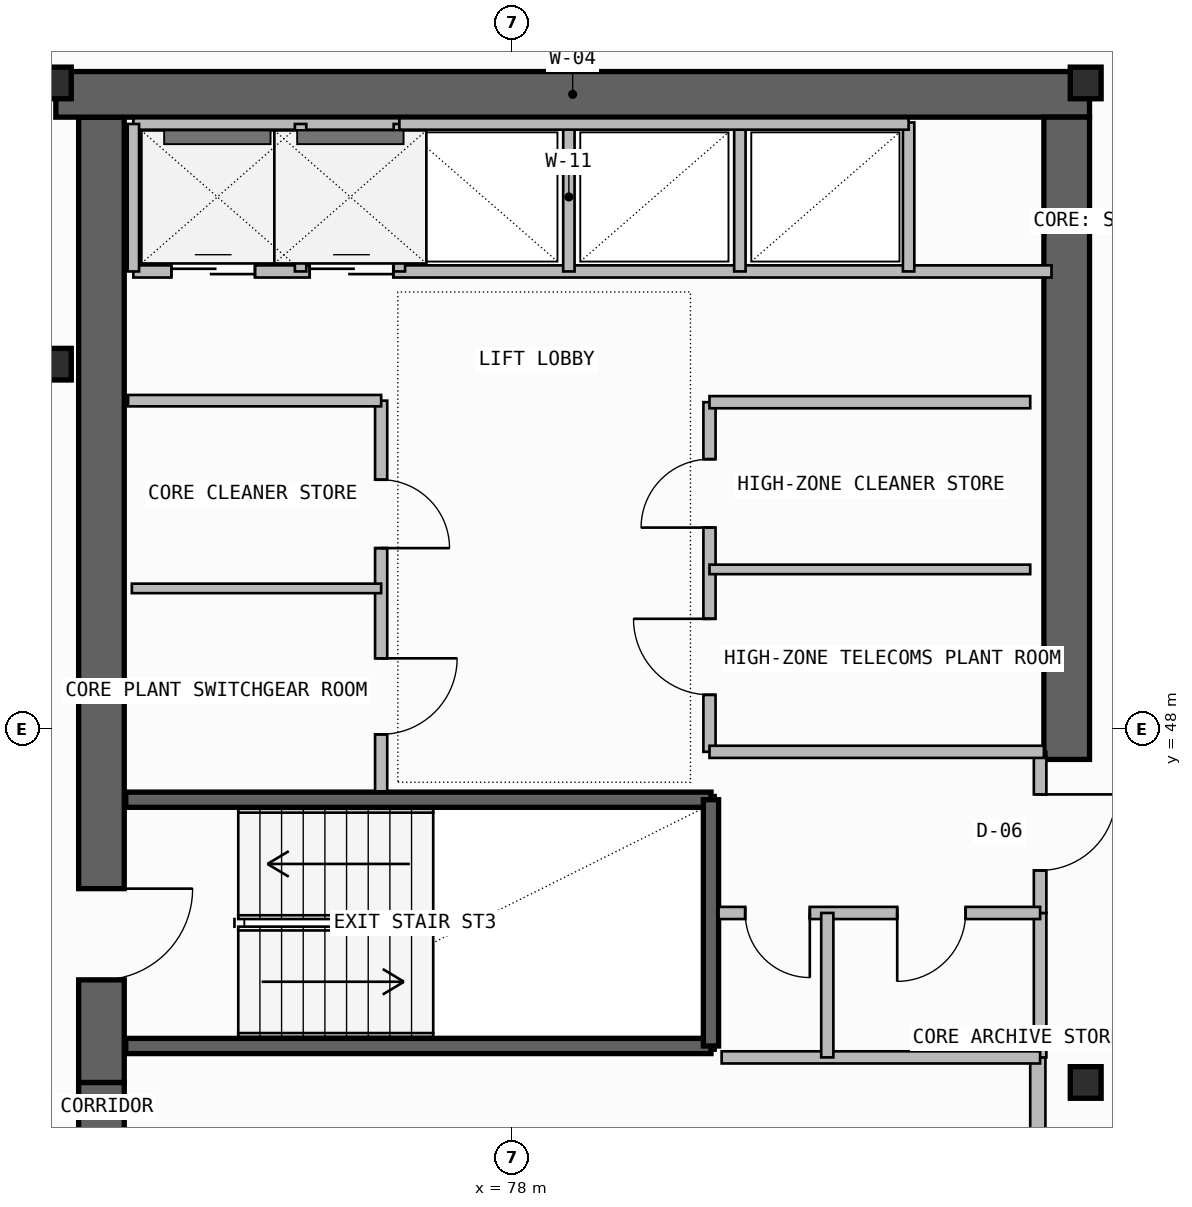
"""IFC4 building model, lengths in metres.
Left out: names, types, materials, properties, quantities, classifications, styles, units other than length and angle.
Written with IfcOpenShell. Run it as: python <this file> out.ifc"""

import sys

from ifc_helpers import new_model, si_unit, direction, frame, frame_2d, origin, origin_2d, place, context, subcontext, project, spatial, rectangle, i_section, extrude, element, fill, save


model = new_model("IFC4")
c1 = context("Model", 3, precision=1e-05, world=origin(), true_north=direction((0.0, 1.0)))
c2 = subcontext(c1, "Body", "Model", "MODEL_VIEW")
j1 = project(units=[si_unit("LENGTHUNIT", "METRE"), si_unit("PLANEANGLEUNIT", "RADIAN")], contexts=[c1])
p1 = place(None, origin())
s1 = spatial("IfcSite", under=j1, at=p1, CompositionType="ELEMENT")
p2 = place(p1, origin())
s2 = spatial("IfcBuilding", under=s1, at=p2, CompositionType="ELEMENT")
p3 = place(p2, frame((0.0, 0.0, 288.9)))
s3 = spatial("IfcBuildingStorey", under=s2, at=p3, CompositionType="ELEMENT", Elevation=288.9)
p4 = place(p3, frame((72.6, 35.5, -0.26), z_axis=(0.0, 0.0, 1.0), x_axis=(0.0, 1.0, 0.0)))
e1 = element("IfcWall", 1, at=p4, inside=s3, PredefinedType="SHEAR", context=c2, shape_type="SweptSolid", body=[
    extrude(rectangle(XDim=7.85, YDim=0.6, at=frame_2d((3.925, 0.0))), origin(), (0.0, 0.0, 1.0), 3.52),
])
p5 = place(p4, frame((1.45, 0.0, 0.26)))
e2 = element("IfcOpeningElement", 2, at=p5, cuts=e1, PredefinedType="OPENING", context=c2, shape_type="SweptSolid", body=[
    extrude(rectangle(XDim=1.2, YDim=2.2, at=frame_2d((0.6, 1.1))), frame((0.0, 0.31, 0.0), z_axis=(0.0, -1.0, 0.0), x_axis=(1.0, 0.0, 0.0)), (0.0, 0.0, 1.0), 0.62),
])
p6 = place(p3, frame((72.6, 43.35, -0.26), z_axis=(0.0, 0.0, 1.0), x_axis=(0.0, 1.0, 0.0)))
e3 = element("IfcWall", 3, at=p6, inside=s3, PredefinedType="SHEAR", context=c2, shape_type="SweptSolid", body=[
    extrude(rectangle(XDim=12.7, YDim=0.6, at=frame_2d((6.35, 0.0))), origin(), (0.0, 0.0, 1.0), 3.52),
])
p7 = place(p6, frame((1.35, 0.0, 0.26)))
e4 = element("IfcOpeningElement", 4, at=p7, cuts=e3, PredefinedType="OPENING", context=c2, shape_type="SweptSolid", body=[
    extrude(rectangle(XDim=1.2, YDim=2.2, at=frame_2d((0.6, 1.1))), frame((0.0, 0.31, 0.0), z_axis=(0.0, -1.0, 0.0), x_axis=(1.0, 0.0, 0.0)), (0.0, 0.0, 1.0), 0.62),
])
p8 = place(p3, frame((72.0, 56.35, -0.26), z_axis=(0.0, 0.0, 1.0), x_axis=(1.0, 0.0, 0.0)))
e5 = element("IfcWall", 5, at=p8, inside=s3, PredefinedType="SHEAR", context=c2, shape_type="SweptSolid", body=[
    extrude(rectangle(XDim=13.6, YDim=0.6, at=frame_2d((6.8, 0.0))), origin(), (0.0, 0.0, 1.0), 3.52),
])
p9 = place(p3, frame((85.3, 47.6, -0.26), z_axis=(0.0, 0.0, 1.0), x_axis=(0.0, 1.0, 0.0)))
e6 = element("IfcWall", 6, at=p9, inside=s3, PredefinedType="SHEAR", context=c2, shape_type="SweptSolid", body=[
    extrude(rectangle(XDim=8.45, YDim=0.6, at=frame_2d((4.225, 0.0))), origin(), (0.0, 0.0, 1.0), 3.52),
])
for number, where, z_axis, x_axis in (
    (7, (85.55, 43.35, 0.0), (0.0, 0.0, 1.0), (1.0, 0.0, 0.0)),
    (8, (72.0, 52.8, 0.0), (0.0, 0.0, 1.0), (1.0, 0.0, 0.0)),
    (9, (72.0, 56.5, 0.0), (0.0, 0.0, 1.0), (1.0, 0.0, 0.0)),
    (10, (85.55, 56.5, 0.0), (0.0, 0.0, 1.0), (1.0, 0.0, 0.0)),
):
    element("IfcColumn", number, at=place(p3, frame(where, z_axis=z_axis, x_axis=x_axis)), inside=s3, PredefinedType="COLUMN", context=c2, shape_type="SweptSolid", body=[
        extrude(i_section(OverallWidth=0.406, OverallDepth=0.416, WebThickness=0.03, FlangeThickness=0.048, FilletRadius=0.015, at=origin_2d()), origin(), (0.0, 0.0, 1.0), 3.52),
    ])
p10 = place(p3, frame((84.92, 38.85, 0.0), z_axis=(0.0, 0.0, 1.0), x_axis=(0.0, 1.0, 0.0)))
e11 = element("IfcWall", 11, at=p10, inside=s3, PredefinedType="SOLIDWALL", context=c2, shape_type="SweptSolid", body=[
    extrude(rectangle(XDim=4.83, YDim=0.2, at=frame_2d((2.415, 0.0))), origin(), (0.0, 0.0, 1.0), 3.26),
])
p11 = place(p10, frame((1.25, 0.0, 0.0)))
e12 = element("IfcOpeningElement", 12, at=p11, cuts=e11, PredefinedType="OPENING", context=c2, shape_type="SweptSolid", body=[
    extrude(rectangle(XDim=1.1, YDim=2.2, at=frame_2d((0.55, 1.1))), frame((0.0, 0.11, 0.0), z_axis=(0.0, -1.0, 0.0), x_axis=(1.0, 0.0, 0.0)), (0.0, 0.0, 1.0), 0.22),
])
for number, where, z_axis, x_axis in (
    (13, (72.92, 43.83, -0.26), (0.0, 0.0, 1.0), (1.0, 0.0, 0.0)),
    (14, (72.92, 47.07, -0.26), (0.0, 0.0, 1.0), (1.0, 0.0, 0.0)),
):
    element("IfcWall", number, at=place(p3, frame(where, z_axis=z_axis, x_axis=x_axis)), inside=s3, PredefinedType="SOLIDWALL", context=c2, shape_type="SweptSolid", body=[
        extrude(rectangle(XDim=7.7, YDim=0.2, at=frame_2d((3.85, 0.0))), origin(), (0.0, 0.0, 1.0), 3.52),
    ])
p12 = place(p3, frame((80.62, 43.83, -0.26), z_axis=(0.0, 0.0, 1.0), x_axis=(0.0, 1.0, 0.0)))
e15 = element("IfcWall", 15, at=p12, inside=s3, PredefinedType="SOLIDWALL", context=c2, shape_type="SweptSolid", body=[
    extrude(rectangle(XDim=3.24, YDim=0.2, at=frame_2d((1.62, 0.0))), origin(), (0.0, 0.0, 1.0), 3.52),
])
p13 = place(p3, frame((84.95, 43.68, 0.0), z_axis=(0.0, 0.0, 1.0), x_axis=(0.0, 1.0, 0.0)))
e16 = element("IfcWall", 16, at=p13, inside=s3, PredefinedType="PLUMBINGWALL", context=c2, shape_type="SweptSolid", body=[
    extrude(rectangle(XDim=1.9, YDim=0.165, at=frame_2d((0.95, 0.0))), origin(), (0.0, 0.0, 1.0), 3.26),
])
p14 = place(p3, frame((84.95, 45.58, 0.0), z_axis=(0.0, 0.0, 1.0), x_axis=(0.0, 1.0, 0.0)))
e17 = element("IfcWall", 17, at=p14, inside=s3, PredefinedType="PARTITIONING", context=c2, shape_type="SweptSolid", body=[
    extrude(rectangle(XDim=2.12, YDim=0.165, at=frame_2d((1.06, 0.0))), origin(), (0.0, 0.0, 1.0), 3.26),
])
p15 = place(p14, frame((0.56, 0.0, 0.0)))
e18 = element("IfcOpeningElement", 18, at=p15, cuts=e17, PredefinedType="OPENING", context=c2, shape_type="SweptSolid", body=[
    extrude(rectangle(XDim=1.0, YDim=2.2, at=frame_2d((0.5, 1.1))), frame((0.0, 0.093, 0.0), z_axis=(0.0, -1.0, 0.0), x_axis=(1.0, 0.0, 0.0)), (0.0, 0.0, 1.0), 0.185),
])
p16 = place(p3, frame((80.72, 45.58, 0.0), z_axis=(0.0, 0.0, 1.0), x_axis=(1.0, 0.0, 0.0)))
e19 = element("IfcWall", 19, at=p16, inside=s3, PredefinedType="PLUMBINGWALL", context=c2, shape_type="SweptSolid", body=[
    extrude(rectangle(XDim=4.23, YDim=0.16, at=frame_2d((2.115, 0.0))), origin(), (0.0, 0.0, 1.0), 3.26),
])
p17 = place(p16, frame((0.35, 0.0, 0.0)))
e20 = element("IfcOpeningElement", 20, at=p17, cuts=e19, PredefinedType="OPENING", context=c2, shape_type="SweptSolid", body=[
    extrude(rectangle(XDim=0.85, YDim=2.05, at=frame_2d((0.425, 1.025))), frame((0.0, 0.09, 0.0), z_axis=(0.0, -1.0, 0.0), x_axis=(1.0, 0.0, 0.0)), (0.0, 0.0, 1.0), 0.18),
])
p18 = place(p16, frame((2.35, 0.0, 0.0)))
e21 = element("IfcOpeningElement", 21, at=p18, cuts=e19, PredefinedType="OPENING", context=c2, shape_type="SweptSolid", body=[
    extrude(rectangle(XDim=0.9, YDim=2.1, at=frame_2d((0.45, 1.05))), frame((0.0, 0.09, 0.0), z_axis=(0.0, -1.0, 0.0), x_axis=(1.0, 0.0, 0.0)), (0.0, 0.0, 1.0), 0.18),
])
p19 = place(p3, frame((80.76, 43.68, 0.0), z_axis=(0.0, 0.0, 1.0), x_axis=(1.0, 0.0, 0.0)))
e22 = element("IfcWall", 22, at=p19, inside=s3, PredefinedType="PLUMBINGWALL", context=c2, shape_type="SweptSolid", body=[
    extrude(rectangle(XDim=4.19, YDim=0.16, at=frame_2d((2.095, 0.0))), origin(), (0.0, 0.0, 1.0), 3.26),
])
p20 = place(p3, frame((82.15, 43.68, 0.0), z_axis=(0.0, 0.0, 1.0), x_axis=(0.0, 1.0, 0.0)))
e23 = element("IfcWall", 23, at=p20, inside=s3, PredefinedType="PLUMBINGWALL", context=c2, shape_type="SweptSolid", body=[
    extrude(rectangle(XDim=1.9, YDim=0.16, at=frame_2d((0.95, 0.0))), origin(), (0.0, 0.0, 1.0), 3.26),
])
p21 = place(p3, frame((76.28, 47.18, 0.0), z_axis=(0.0, 0.0, 1.0), x_axis=(0.0, 1.0, 0.0)))
e24 = element("IfcWall", 24, at=p21, inside=s3, PredefinedType="SOLIDWALL", context=c2, shape_type="SweptSolid", body=[
    extrude(rectangle(XDim=5.14, YDim=0.16, at=frame_2d((2.57, 0.0))), origin(), (0.0, 0.0, 1.0), 3.26),
])
p22 = place(p21, frame((0.75, 0.0, 0.0)))
e25 = element("IfcOpeningElement", 25, at=p22, cuts=e24, PredefinedType="OPENING", context=c2, shape_type="SweptSolid", body=[
    extrude(rectangle(XDim=1.0, YDim=2.2, at=frame_2d((0.5, 1.1))), frame((0.0, 0.09, 0.0), z_axis=(0.0, -1.0, 0.0), x_axis=(1.0, 0.0, 0.0)), (0.0, 0.0, 1.0), 0.18),
])
p23 = place(p21, frame((3.2, 0.0, 0.0)))
e26 = element("IfcOpeningElement", 26, at=p23, cuts=e24, PredefinedType="OPENING", context=c2, shape_type="SweptSolid", body=[
    extrude(rectangle(XDim=0.9, YDim=2.1, at=frame_2d((0.45, 1.05))), frame((0.0, 0.09, 0.0), z_axis=(0.0, -1.0, 0.0), x_axis=(1.0, 0.0, 0.0)), (0.0, 0.0, 1.0), 0.18),
])
p24 = place(p3, frame((72.95, 52.32, 0.0), z_axis=(0.0, 0.0, 1.0), x_axis=(1.0, 0.0, 0.0)))
e27 = element("IfcWall", 27, at=p24, inside=s3, PredefinedType="SOLIDWALL", context=c2, shape_type="SweptSolid", body=[
    extrude(rectangle(XDim=3.33, YDim=0.15, at=frame_2d((1.665, 0.0))), origin(), (0.0, 0.0, 1.0), 3.26),
])
p25 = place(p3, frame((73.0, 49.85, 0.0), z_axis=(0.0, 0.0, 1.0), x_axis=(1.0, 0.0, 0.0)))
e28 = element("IfcWall", 28, at=p25, inside=s3, PredefinedType="PARTITIONING", context=c2, shape_type="SweptSolid", body=[
    extrude(rectangle(XDim=3.28, YDim=0.125, at=frame_2d((1.64, 0.0))), origin(), (0.0, 0.0, 1.0), 3.26),
])
p26 = place(p3, frame((80.6, 47.7, 0.0), z_axis=(0.0, 0.0, 1.0), x_axis=(0.0, 1.0, 0.0)))
e29 = element("IfcWall", 29, at=p26, inside=s3, PredefinedType="SOLIDWALL", context=c2, shape_type="SweptSolid", body=[
    extrude(rectangle(XDim=4.6, YDim=0.16, at=frame_2d((2.3, 0.0))), origin(), (0.0, 0.0, 1.0), 3.26),
])
p27 = place(p26, frame((0.75, 0.0, 0.0)))
e30 = element("IfcOpeningElement", 30, at=p27, cuts=e29, PredefinedType="OPENING", context=c2, shape_type="SweptSolid", body=[
    extrude(rectangle(XDim=1.0, YDim=2.2, at=frame_2d((0.5, 1.1))), frame((0.0, 0.09, 0.0), z_axis=(0.0, -1.0, 0.0), x_axis=(1.0, 0.0, 0.0)), (0.0, 0.0, 1.0), 0.18),
])
p28 = place(p26, frame((2.95, 0.0, 0.0)))
e31 = element("IfcOpeningElement", 31, at=p28, cuts=e29, PredefinedType="OPENING", context=c2, shape_type="SweptSolid", body=[
    extrude(rectangle(XDim=0.9, YDim=2.1, at=frame_2d((0.45, 1.05))), frame((0.0, 0.09, 0.0), z_axis=(0.0, -1.0, 0.0), x_axis=(1.0, 0.0, 0.0)), (0.0, 0.0, 1.0), 0.18),
])
p29 = place(p3, frame((80.6, 47.7, 0.0), z_axis=(0.0, 0.0, 1.0), x_axis=(1.0, 0.0, 0.0)))
e32 = element("IfcWall", 32, at=p29, inside=s3, PredefinedType="SOLIDWALL", context=c2, shape_type="SweptSolid", body=[
    extrude(rectangle(XDim=4.4, YDim=0.16, at=frame_2d((2.2, 0.0))), origin(), (0.0, 0.0, 1.0), 3.26),
])
p30 = place(p3, frame((80.6, 52.3, 0.0), z_axis=(0.0, 0.0, 1.0), x_axis=(1.0, 0.0, 0.0)))
e33 = element("IfcWall", 33, at=p30, inside=s3, PredefinedType="SOLIDWALL", context=c2, shape_type="SweptSolid", body=[
    extrude(rectangle(XDim=4.22, YDim=0.16, at=frame_2d((2.11, 0.0))), origin(), (0.0, 0.0, 1.0), 3.26),
])
p31 = place(p3, frame((80.6, 50.1, 0.0), z_axis=(0.0, 0.0, 1.0), x_axis=(1.0, 0.0, 0.0)))
e34 = element("IfcWall", 34, at=p31, inside=s3, PredefinedType="PARTITIONING", context=c2, shape_type="SweptSolid", body=[
    extrude(rectangle(XDim=4.22, YDim=0.125, at=frame_2d((2.11, 0.0))), origin(), (0.0, 0.0, 1.0), 3.26),
])
p32 = place(p3, frame((73.02, 54.02, 0.0), z_axis=(0.0, 0.0, 1.0), x_axis=(1.0, 0.0, 0.0)))
e35 = element("IfcWall", 35, at=p32, inside=s3, PredefinedType="SOLIDWALL", context=c2, shape_type="SweptSolid", body=[
    extrude(rectangle(XDim=12.08, YDim=0.16, at=frame_2d((6.04, 0.0))), origin(), (0.0, 0.0, 1.0), 3.26),
])
p33 = place(p32, frame((0.5, 0.0, 0.0)))
e36 = element("IfcOpeningElement", 36, at=p33, cuts=e35, PredefinedType="OPENING", context=c2, shape_type="SweptSolid", body=[
    extrude(rectangle(XDim=1.1, YDim=2.25, at=frame_2d((0.55, 1.125))), frame((0.0, 0.09, 0.0), z_axis=(0.0, -1.0, 0.0), x_axis=(1.0, 0.0, 0.0)), (0.0, 0.0, 1.0), 0.18),
])
p34 = place(p32, frame((2.32, 0.0, 0.0)))
e37 = element("IfcOpeningElement", 37, at=p34, cuts=e35, PredefinedType="OPENING", context=c2, shape_type="SweptSolid", body=[
    extrude(rectangle(XDim=1.1, YDim=2.25, at=frame_2d((0.55, 1.125))), frame((0.0, 0.09, 0.0), z_axis=(0.0, -1.0, 0.0), x_axis=(1.0, 0.0, 0.0)), (0.0, 0.0, 1.0), 0.18),
])
p35 = place(p3, frame((73.02, 55.96, 0.0), z_axis=(0.0, 0.0, 1.0), x_axis=(1.0, 0.0, 0.0)))
e38 = element("IfcWall", 38, at=p35, inside=s3, PredefinedType="SOLIDWALL", context=c2, shape_type="SweptSolid", body=[
    extrude(rectangle(XDim=3.5, YDim=0.15, at=frame_2d((1.75, 0.0))), origin(), (0.0, 0.0, 1.0), 3.26),
])
p36 = place(p3, frame((73.02, 54.02, 0.0), z_axis=(0.0, 0.0, 1.0), x_axis=(0.0, 1.0, 0.0)))
e39 = element("IfcWall", 39, at=p36, inside=s3, PredefinedType="PLUMBINGWALL", context=c2, shape_type="SweptSolid", body=[
    extrude(rectangle(XDim=1.94, YDim=0.15, at=frame_2d((0.97, 0.0))), origin(), (0.0, 0.0, 1.0), 3.26),
])
p37 = place(p3, frame((76.52, 54.02, 0.0), z_axis=(0.0, 0.0, 1.0), x_axis=(0.0, 1.0, 0.0)))
e40 = element("IfcWall", 40, at=p37, inside=s3, PredefinedType="SOLIDWALL", context=c2, shape_type="SweptSolid", body=[
    extrude(rectangle(XDim=1.94, YDim=0.15, at=frame_2d((0.97, 0.0))), origin(), (0.0, 0.0, 1.0), 3.26),
])
p38 = place(p3, frame((75.22, 54.02, 0.0), z_axis=(0.0, 0.0, 1.0), x_axis=(0.0, 1.0, 0.0)))
e41 = element("IfcWall", 41, at=p38, inside=s3, PredefinedType="PLUMBINGWALL", context=c2, shape_type="SweptSolid", body=[
    extrude(rectangle(XDim=1.94, YDim=0.15, at=frame_2d((0.97, 0.0))), origin(), (0.0, 0.0, 1.0), 3.26),
])
for number, where, z_axis, x_axis in (
    (42, (78.75, 54.02, 0.0), (0.0, 0.0, 1.0), (0.0, 1.0, 0.0)),
    (43, (81.0, 54.02, 0.0), (0.0, 0.0, 1.0), (0.0, 1.0, 0.0)),
):
    element("IfcWall", number, at=place(p3, frame(where, z_axis=z_axis, x_axis=x_axis)), inside=s3, PredefinedType="PLUMBINGWALL", context=c2, shape_type="SweptSolid", body=[
        extrude(rectangle(XDim=1.96, YDim=0.15, at=frame_2d((0.98, 0.0))), origin(), (0.0, 0.0, 1.0), 3.26),
    ])
p39 = place(p3, frame((83.22, 54.02, 0.0), z_axis=(0.0, 0.0, 1.0), x_axis=(0.0, 1.0, 0.0)))
e44 = element("IfcWall", 44, at=p39, inside=s3, PredefinedType="SOLIDWALL", context=c2, shape_type="SweptSolid", body=[
    extrude(rectangle(XDim=1.96, YDim=0.15, at=frame_2d((0.98, 0.0))), origin(), (0.0, 0.0, 1.0), 3.26),
])
p40 = place(p3, frame((76.52, 55.96, 0.0), z_axis=(0.0, 0.0, 1.0), x_axis=(1.0, 0.0, 0.0)))
e45 = element("IfcWall", 45, at=p40, inside=s3, PredefinedType="SOLIDWALL", context=c2, shape_type="SweptSolid", body=[
    extrude(rectangle(XDim=6.7, YDim=0.15, at=frame_2d((3.35, 0.0))), origin(), (0.0, 0.0, 1.0), 3.26),
])
p41 = place(p7, frame((1.2, 0.0, 0.0), z_axis=(0.0, 0.0, 1.0), x_axis=(-1.0, 0.0, 0.0)))
e46 = element("IfcDoor", 46, at=p41, inside=s3, OperationType="SINGLE_SWING_LEFT", PredefinedType="USERDEFINED", context=c2, shape_type="SweptSolid", body=[
    extrude(rectangle(XDim=1.2, YDim=2.2, at=frame_2d((0.6, 1.1))), frame((0.0, 0.025, 0.0), z_axis=(0.0, -1.0, 0.0), x_axis=(1.0, 0.0, 0.0)), (0.0, 0.0, 1.0), 0.05),
])
fill(e4, e46)
p42 = place(p15, frame((1.0, 0.0, 0.0), z_axis=(0.0, 0.0, 1.0), x_axis=(-1.0, 0.0, 0.0)))
e47 = element("IfcDoor", 47, at=p42, inside=s3, OperationType="SINGLE_SWING_LEFT", PredefinedType="DOOR", context=c2, shape_type="SweptSolid", body=[
    extrude(rectangle(XDim=1.0, YDim=2.2, at=frame_2d((0.5, 1.1))), frame((0.0, 0.025, 0.0), z_axis=(0.0, -1.0, 0.0), x_axis=(1.0, 0.0, 0.0)), (0.0, 0.0, 1.0), 0.05),
])
fill(e18, e47)
p43 = place(p17, frame((0.85, 0.0, 0.0), z_axis=(0.0, 0.0, 1.0), x_axis=(-1.0, 0.0, 0.0)))
e48 = element("IfcDoor", 48, at=p43, inside=s3, OperationType="SINGLE_SWING_LEFT", PredefinedType="DOOR", context=c2, shape_type="SweptSolid", body=[
    extrude(rectangle(XDim=0.85, YDim=2.05, at=frame_2d((0.425, 1.025))), frame((0.0, 0.025, 0.0), z_axis=(0.0, -1.0, 0.0), x_axis=(1.0, 0.0, 0.0)), (0.0, 0.0, 1.0), 0.05),
])
fill(e20, e48)
p44 = place(p18, frame((0.9, 0.0, 0.0), z_axis=(0.0, 0.0, 1.0), x_axis=(-1.0, 0.0, 0.0)))
e49 = element("IfcDoor", 49, at=p44, inside=s3, OperationType="SINGLE_SWING_RIGHT", PredefinedType="DOOR", context=c2, shape_type="SweptSolid", body=[
    extrude(rectangle(XDim=0.9, YDim=2.1, at=frame_2d((0.45, 1.05))), frame((0.0, 0.025, 0.0), z_axis=(0.0, -1.0, 0.0), x_axis=(1.0, 0.0, 0.0)), (0.0, 0.0, 1.0), 0.05),
])
fill(e21, e49)
p45 = place(p22, frame((1.0, 0.0, 0.0), z_axis=(0.0, 0.0, 1.0), x_axis=(-1.0, 0.0, 0.0)))
e50 = element("IfcDoor", 50, at=p45, inside=s3, OperationType="SINGLE_SWING_LEFT", PredefinedType="DOOR", context=c2, shape_type="SweptSolid", body=[
    extrude(rectangle(XDim=1.0, YDim=2.2, at=frame_2d((0.5, 1.1))), frame((0.0, 0.025, 0.0), z_axis=(0.0, -1.0, 0.0), x_axis=(1.0, 0.0, 0.0)), (0.0, 0.0, 1.0), 0.05),
])
fill(e25, e50)
p46 = place(p23, frame((0.9, 0.0, 0.0), z_axis=(0.0, 0.0, 1.0), x_axis=(-1.0, 0.0, 0.0)))
e51 = element("IfcDoor", 51, at=p46, inside=s3, OperationType="SINGLE_SWING_RIGHT", PredefinedType="DOOR", context=c2, shape_type="SweptSolid", body=[
    extrude(rectangle(XDim=0.9, YDim=2.1, at=frame_2d((0.45, 1.05))), frame((0.0, 0.025, 0.0), z_axis=(0.0, -1.0, 0.0), x_axis=(1.0, 0.0, 0.0)), (0.0, 0.0, 1.0), 0.05),
])
fill(e26, e51)
p47 = place(p27, origin())
e52 = element("IfcDoor", 52, at=p47, inside=s3, OperationType="SINGLE_SWING_RIGHT", PredefinedType="DOOR", context=c2, shape_type="SweptSolid", body=[
    extrude(rectangle(XDim=1.0, YDim=2.2, at=frame_2d((0.5, 1.1))), frame((0.0, 0.025, 0.0), z_axis=(0.0, -1.0, 0.0), x_axis=(1.0, 0.0, 0.0)), (0.0, 0.0, 1.0), 0.05),
])
fill(e30, e52)
p48 = place(p28, origin())
e53 = element("IfcDoor", 53, at=p48, inside=s3, OperationType="SINGLE_SWING_LEFT", PredefinedType="DOOR", context=c2, shape_type="SweptSolid", body=[
    extrude(rectangle(XDim=0.9, YDim=2.1, at=frame_2d((0.45, 1.05))), frame((0.0, 0.025, 0.0), z_axis=(0.0, -1.0, 0.0), x_axis=(1.0, 0.0, 0.0)), (0.0, 0.0, 1.0), 0.05),
])
fill(e31, e53)
p49 = place(p33, origin())
e54 = element("IfcDoor", 54, at=p49, inside=s3, OperationType="DOUBLE_DOOR_SLIDING", PredefinedType="DOOR", context=c2, shape_type="SweptSolid", body=[
    extrude(rectangle(XDim=1.1, YDim=2.25, at=frame_2d((0.55, 1.125))), frame((0.0, 0.025, 0.0), z_axis=(0.0, -1.0, 0.0), x_axis=(1.0, 0.0, 0.0)), (0.0, 0.0, 1.0), 0.05),
])
fill(e36, e54)
p50 = place(p34, origin())
e55 = element("IfcDoor", 55, at=p50, inside=s3, OperationType="DOUBLE_DOOR_SLIDING", PredefinedType="DOOR", context=c2, shape_type="SweptSolid", body=[
    extrude(rectangle(XDim=1.1, YDim=2.25, at=frame_2d((0.55, 1.125))), frame((0.0, 0.025, 0.0), z_axis=(0.0, -1.0, 0.0), x_axis=(1.0, 0.0, 0.0)), (0.0, 0.0, 1.0), 0.05),
])
fill(e37, e55)
save(model, sys.argv[1])
